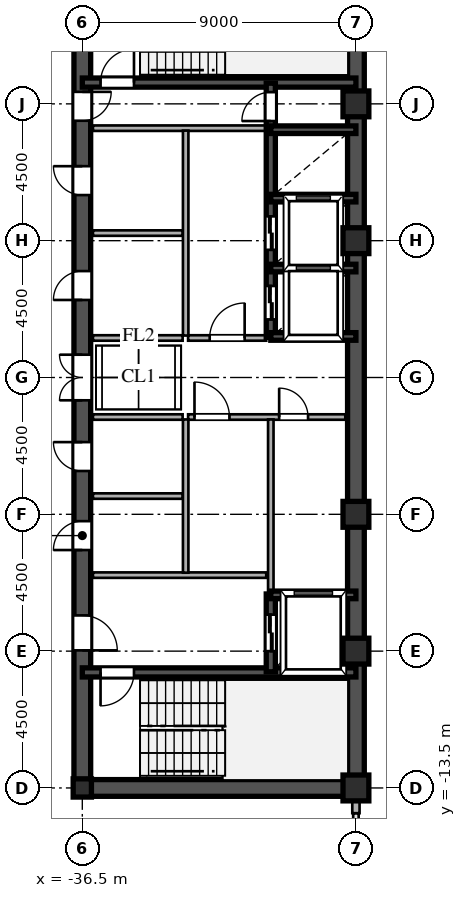
"""IFC4 building model, lengths in metres.
Left out: names, types, materials, properties, quantities, classifications, styles, units other than length and angle.
Written with IfcOpenShell. Run it as: python <this file> out.ifc"""

import sys

from ifc_helpers import new_model, si_unit, direction, frame, frame_2d, origin, origin_2d, place, context, subcontext, project, spatial, rectangle, hollow_rectangle, i_section, extrude, source, transform, mapped, element, fill, save


model = new_model("IFC4")
c1 = context("Model", 3, precision=1e-05, world=origin(), true_north=direction((0.0, 1.0)))
c2 = subcontext(c1, "Body", "Model", "MODEL_VIEW")
j1 = project(units=[si_unit("LENGTHUNIT", "METRE"), si_unit("PLANEANGLEUNIT", "RADIAN")], contexts=[c1])
p1 = place(None, origin())
s1 = spatial("IfcSite", under=j1, at=p1, CompositionType="ELEMENT")
p2 = place(p1, origin())
s2 = spatial("IfcBuilding", under=s1, at=p2, CompositionType="ELEMENT")
p3 = place(p2, frame((0.0, 0.0, 167.1)))
s3 = spatial("IfcBuildingStorey", under=s2, at=p3, CompositionType="ELEMENT", Elevation=167.1)
m1 = source(origin(), c2, "Body", "SweptSolid", [
    extrude(hollow_rectangle(XDim=0.85, YDim=0.85, WallThickness=0.036, at=origin_2d()), origin(), (0.0, 0.0, 1.0), 3.6),
])
for number, where, z_axis, x_axis in (
    (1, (-27.5, -13.5, 0.0), (0.0, 0.0, 1.0), (1.0, 0.0, 0.0)),
    (2, (-27.5, -9.0, 0.0), (0.0, 0.0, 1.0), (1.0, 0.0, 0.0)),
    (3, (-27.5, -4.5, 0.0), (0.0, 0.0, 1.0), (1.0, 0.0, 0.0)),
    (4, (-27.5, 4.5, 0.0), (0.0, 0.0, 1.0), (1.0, 0.0, 0.0)),
    (5, (-27.5, 9.0, 0.0), (0.0, 0.0, 1.0), (1.0, 0.0, 0.0)),
):
    element("IfcColumn", number, at=place(p3, frame(where, z_axis=z_axis, x_axis=x_axis)), inside=s3, PredefinedType="COLUMN", context=c2, shape_type="MappedRepresentation", body=[
        mapped(m1, transform((0.0, 0.0, 0.0), scale=1.0)),
    ])
m2 = source(origin(), c2, "Body", "SweptSolid", [
    extrude(i_section(OverallWidth=0.6, OverallDepth=0.6, WebThickness=0.025, FlangeThickness=0.04, at=origin_2d()), origin(), (0.0, 0.0, 1.0), 3.6),
])
p4 = place(p3, frame((-36.5, -13.5, 0.0), z_axis=(0.0, 0.0, 1.0), x_axis=(1.0, 0.0, 0.0)))
e6 = element("IfcColumn", 6, at=p4, inside=s3, PredefinedType="COLUMN", context=c2, shape_type="MappedRepresentation", body=[
    mapped(m2, transform((0.0, 0.0, 0.0), scale=1.0)),
])
p5 = place(p3, frame((-27.5, -14.33, 0.0), z_axis=(0.0, 0.0, 1.0), x_axis=(0.0, 1.0, 0.0)))
e7 = element("IfcWall", 7, at=p5, inside=s3, PredefinedType="SOLIDWALL", context=c2, shape_type="SweptSolid", body=[
    extrude(rectangle(XDim=0.55, YDim=0.24, at=frame_2d((0.275, 0.0))), origin(), (0.0, 0.0, 1.0), 2.88),
])
for number, where, z_axis, x_axis in (
    (8, (-27.5, -13.5, 0.0), (0.0, 0.0, 1.0), (0.0, 1.0, 0.0)),
    (9, (-27.5, 1.3, 0.0), (0.0, 0.0, 1.0), (0.0, 1.0, 0.0)),
):
    element("IfcWall", number, at=place(p3, frame(where, z_axis=z_axis, x_axis=x_axis)), inside=s3, PredefinedType="SHEAR", context=c2, shape_type="SweptSolid", body=[
        extrude(rectangle(XDim=12.2, YDim=0.55, at=frame_2d((6.1, 0.0))), origin(), (0.0, 0.0, 1.0), 3.38),
    ])
p6 = place(p3, frame((-27.5, -1.3, 0.0), z_axis=(0.0, 0.0, 1.0), x_axis=(0.0, 1.0, 0.0)))
e10 = element("IfcWall", 10, at=p6, inside=s3, PredefinedType="SHEAR", context=c2, shape_type="SweptSolid", body=[
    extrude(rectangle(XDim=2.6, YDim=0.55, at=frame_2d((1.3, 0.0))), origin(), (0.0, 0.0, 1.0), 3.38),
])
p7 = place(p3, frame((-36.5, -13.5, 0.0), z_axis=(0.0, 0.0, 1.0), x_axis=(1.0, 0.0, 0.0)))
e11 = element("IfcWall", 11, at=p7, inside=s3, PredefinedType="SHEAR", context=c2, shape_type="SweptSolid", body=[
    extrude(rectangle(XDim=9.0, YDim=0.55, at=frame_2d((4.5, 0.0))), origin(), (0.0, 0.0, 1.0), 3.38),
])
p8 = place(p3, frame((-36.5, -13.65, 0.0), z_axis=(0.0, 0.0, 1.0), x_axis=(0.0, 1.0, 0.0)))
e12 = element("IfcWall", 12, at=p8, inside=s3, PredefinedType="SHEAR", context=c2, shape_type="SweptSolid", body=[
    extrude(rectangle(XDim=7.15, YDim=0.55, at=frame_2d((3.575, 0.0))), origin(), (0.0, 0.0, 1.0), 3.38),
])
p9 = place(p8, frame((4.675, 0.0, 0.0)))
e13 = element("IfcOpeningElement", 13, at=p9, cuts=e12, PredefinedType="OPENING", context=c2, shape_type="SweptSolid", body=[
    extrude(rectangle(XDim=1.15, YDim=2.2, at=frame_2d((0.575, 1.1))), frame((0.0, 0.285, 0.0), z_axis=(0.0, -1.0, 0.0), x_axis=(1.0, 0.0, 0.0)), (0.0, 0.0, 1.0), 0.57),
])
p10 = place(p3, frame((-36.5, -1.3, 0.0), z_axis=(0.0, 0.0, 1.0), x_axis=(0.0, 1.0, 0.0)))
e14 = element("IfcWall", 14, at=p10, inside=s3, PredefinedType="SHEAR", context=c2, shape_type="SweptSolid", body=[
    extrude(rectangle(XDim=2.6, YDim=0.55, at=frame_2d((1.3, 0.0))), origin(), (0.0, 0.0, 1.0), 3.38),
])
p11 = place(p10, frame((0.55, 0.0, 0.0)))
e15 = element("IfcOpeningElement", 15, at=p11, cuts=e14, PredefinedType="OPENING", context=c2, shape_type="SweptSolid", body=[
    extrude(rectangle(XDim=1.5, YDim=2.3, at=frame_2d((0.75, 1.15))), frame((0.0, 0.285, 0.0), z_axis=(0.0, -1.0, 0.0), x_axis=(1.0, 0.0, 0.0)), (0.0, 0.0, 1.0), 0.57),
])
p12 = place(p3, frame((-36.5, 8.2, 0.0), z_axis=(0.0, 0.0, 1.0), x_axis=(0.0, 1.0, 0.0)))
e16 = element("IfcWall", 16, at=p12, inside=s3, PredefinedType="SHEAR", context=c2, shape_type="SweptSolid", body=[
    extrude(rectangle(XDim=5.45, YDim=0.55, at=frame_2d((2.725, 0.0))), origin(), (0.0, 0.0, 1.0), 3.38),
])
p13 = place(p12, frame((0.245, 0.0, 0.0)))
e17 = element("IfcOpeningElement", 17, at=p13, cuts=e16, PredefinedType="OPENING", context=c2, shape_type="SweptSolid", body=[
    extrude(rectangle(XDim=0.95, YDim=2.15, at=frame_2d((0.475, 1.075))), frame((0.0, 0.285, 0.0), z_axis=(0.0, -1.0, 0.0), x_axis=(1.0, 0.0, 0.0)), (0.0, 0.0, 1.0), 0.57),
])
p14 = place(p3, frame((-36.5, -6.5, 0.0), z_axis=(0.0, 0.0, 1.0), x_axis=(0.0, 1.0, 0.0)))
e18 = element("IfcWall", 18, at=p14, inside=s3, PredefinedType="SHEAR", context=c2, shape_type="SweptSolid", body=[
    extrude(rectangle(XDim=2.6, YDim=0.55, at=frame_2d((1.3, 0.0))), origin(), (0.0, 0.0, 1.0), 3.38),
])
p15 = place(p14, frame((0.825, 0.0, 0.0)))
e19 = element("IfcOpeningElement", 19, at=p15, cuts=e18, PredefinedType="OPENING", context=c2, shape_type="SweptSolid", body=[
    extrude(rectangle(XDim=0.95, YDim=2.15, at=frame_2d((0.475, 1.075))), frame((0.0, 0.285, 0.0), z_axis=(0.0, -1.0, 0.0), x_axis=(1.0, 0.0, 0.0)), (0.0, 0.0, 1.0), 0.57),
])
p16 = place(p3, frame((-36.5, -3.9, 0.0), z_axis=(0.0, 0.0, 1.0), x_axis=(0.0, 1.0, 0.0)))
e20 = element("IfcWall", 20, at=p16, inside=s3, PredefinedType="SHEAR", context=c2, shape_type="SweptSolid", body=[
    extrude(rectangle(XDim=2.6, YDim=0.55, at=frame_2d((1.3, 0.0))), origin(), (0.0, 0.0, 1.0), 3.38),
])
p17 = place(p16, frame((0.825, 0.0, 0.0)))
e21 = element("IfcOpeningElement", 21, at=p17, cuts=e20, PredefinedType="OPENING", context=c2, shape_type="SweptSolid", body=[
    extrude(rectangle(XDim=0.95, YDim=2.15, at=frame_2d((0.475, 1.075))), frame((0.0, 0.285, 0.0), z_axis=(0.0, -1.0, 0.0), x_axis=(1.0, 0.0, 0.0)), (0.0, 0.0, 1.0), 0.57),
])
p18 = place(p3, frame((-36.5, 1.3, 0.0), z_axis=(0.0, 0.0, 1.0), x_axis=(0.0, 1.0, 0.0)))
e22 = element("IfcWall", 22, at=p18, inside=s3, PredefinedType="SHEAR", context=c2, shape_type="SweptSolid", body=[
    extrude(rectangle(XDim=3.45, YDim=0.55, at=frame_2d((1.725, 0.0))), origin(), (0.0, 0.0, 1.0), 3.38),
])
p19 = place(p18, frame((1.25, 0.0, 0.0)))
e23 = element("IfcOpeningElement", 23, at=p19, cuts=e22, PredefinedType="OPENING", context=c2, shape_type="SweptSolid", body=[
    extrude(rectangle(XDim=0.95, YDim=2.15, at=frame_2d((0.475, 1.075))), frame((0.0, 0.285, 0.0), z_axis=(0.0, -1.0, 0.0), x_axis=(1.0, 0.0, 0.0)), (0.0, 0.0, 1.0), 0.57),
])
p20 = place(p3, frame((-36.5, 4.75, 0.0), z_axis=(0.0, 0.0, 1.0), x_axis=(0.0, 1.0, 0.0)))
e24 = element("IfcWall", 24, at=p20, inside=s3, PredefinedType="SHEAR", context=c2, shape_type="SweptSolid", body=[
    extrude(rectangle(XDim=3.45, YDim=0.55, at=frame_2d((1.725, 0.0))), origin(), (0.0, 0.0, 1.0), 3.38),
])
p21 = place(p20, frame((1.25, 0.0, 0.0)))
e25 = element("IfcOpeningElement", 25, at=p21, cuts=e24, PredefinedType="OPENING", context=c2, shape_type="SweptSolid", body=[
    extrude(rectangle(XDim=0.95, YDim=2.15, at=frame_2d((0.475, 1.075))), frame((0.0, 0.285, 0.0), z_axis=(0.0, -1.0, 0.0), x_axis=(1.0, 0.0, 0.0)), (0.0, 0.0, 1.0), 0.57),
])
p22 = place(p3, frame((-36.5, -9.7, 0.0), z_axis=(0.0, 0.0, 1.0), x_axis=(1.0, 0.0, 0.0)))
e26 = element("IfcWall", 26, at=p22, inside=s3, PredefinedType="SHEAR", context=c2, shape_type="SweptSolid", body=[
    extrude(rectangle(XDim=9.0, YDim=0.3, at=frame_2d((4.5, 0.0))), origin(), (0.0, 0.0, 1.0), 3.38),
])
p23 = place(p22, frame((0.6, 0.0, 0.0)))
e27 = element("IfcOpeningElement", 27, at=p23, cuts=e26, PredefinedType="OPENING", context=c2, shape_type="SweptSolid", body=[
    extrude(rectangle(XDim=1.1, YDim=2.2, at=frame_2d((0.55, 1.1))), frame((0.0, 0.16, 0.0), z_axis=(0.0, -1.0, 0.0), x_axis=(1.0, 0.0, 0.0)), (0.0, 0.0, 1.0), 0.32),
])
p24 = place(p3, frame((-36.5, 9.7, 0.0), z_axis=(0.0, 0.0, 1.0), x_axis=(1.0, 0.0, 0.0)))
e28 = element("IfcWall", 28, at=p24, inside=s3, PredefinedType="SHEAR", context=c2, shape_type="SweptSolid", body=[
    extrude(rectangle(XDim=9.0, YDim=0.3, at=frame_2d((4.5, 0.0))), origin(), (0.0, 0.0, 1.0), 3.38),
])
p25 = place(p24, frame((0.6, 0.0, 0.0)))
e29 = element("IfcOpeningElement", 29, at=p25, cuts=e28, PredefinedType="OPENING", context=c2, shape_type="SweptSolid", body=[
    extrude(rectangle(XDim=1.1, YDim=2.2, at=frame_2d((0.55, 1.1))), frame((0.0, 0.16, 0.0), z_axis=(0.0, -1.0, 0.0), x_axis=(1.0, 0.0, 0.0)), (0.0, 0.0, 1.0), 0.32),
])
for number, where, z_axis, x_axis in (
    (30, (-30.3, -7.15, 0.0), (0.0, 0.0, 1.0), (1.0, 0.0, 0.0)),
    (31, (-30.3, 1.35, 0.0), (0.0, 0.0, 1.0), (1.0, 0.0, 0.0)),
    (32, (-30.3, 3.6, 0.0), (0.0, 0.0, 1.0), (1.0, 0.0, 0.0)),
    (33, (-30.3, 5.9, 0.0), (0.0, 0.0, 1.0), (1.0, 0.0, 0.0)),
    (34, (-30.3, 8.15, 0.0), (0.0, 0.0, 1.0), (1.0, 0.0, 0.0)),
):
    element("IfcWall", number, at=place(p3, frame(where, z_axis=z_axis, x_axis=x_axis)), inside=s3, PredefinedType="SHEAR", context=c2, shape_type="SweptSolid", body=[
        extrude(rectangle(XDim=2.8, YDim=0.25, at=frame_2d((1.4, 0.0))), origin(), (0.0, 0.0, 1.0), 3.38),
    ])
p26 = place(p3, frame((-30.3, -9.68, 0.0), z_axis=(0.0, 0.0, 1.0), x_axis=(0.0, 1.0, 0.0)))
e35 = element("IfcWall", 35, at=p26, inside=s3, PredefinedType="SHEAR", context=c2, shape_type="SweptSolid", body=[
    extrude(rectangle(XDim=2.56, YDim=0.3, at=frame_2d((1.28, 0.0))), origin(), (0.0, 0.0, 1.0), 3.38),
])
p27 = place(p26, frame((0.68, 0.0, 0.0)))
e36 = element("IfcOpeningElement", 36, at=p27, cuts=e35, PredefinedType="OPENING", context=c2, shape_type="SweptSolid", body=[
    extrude(rectangle(XDim=1.2, YDim=2.25, at=frame_2d((0.6, 1.125))), frame((0.0, 0.16, 0.0), z_axis=(0.0, -1.0, 0.0), x_axis=(1.0, 0.0, 0.0)), (0.0, 0.0, 1.0), 0.32),
])
p28 = place(p3, frame((-30.3, 1.32, 0.0), z_axis=(0.0, 0.0, 1.0), x_axis=(0.0, 1.0, 0.0)))
e37 = element("IfcWall", 37, at=p28, inside=s3, PredefinedType="SHEAR", context=c2, shape_type="SweptSolid", body=[
    extrude(rectangle(XDim=2.28, YDim=0.3, at=frame_2d((1.14, 0.0))), origin(), (0.0, 0.0, 1.0), 3.38),
])
p29 = place(p28, frame((0.59, 0.0, 0.0)))
e38 = element("IfcOpeningElement", 38, at=p29, cuts=e37, PredefinedType="OPENING", context=c2, shape_type="SweptSolid", body=[
    extrude(rectangle(XDim=1.1, YDim=2.2, at=frame_2d((0.55, 1.1))), frame((0.0, 0.16, 0.0), z_axis=(0.0, -1.0, 0.0), x_axis=(1.0, 0.0, 0.0)), (0.0, 0.0, 1.0), 0.32),
])
p30 = place(p3, frame((-30.3, 3.6, 0.0), z_axis=(0.0, 0.0, 1.0), x_axis=(0.0, 1.0, 0.0)))
e39 = element("IfcWall", 39, at=p30, inside=s3, PredefinedType="SHEAR", context=c2, shape_type="SweptSolid", body=[
    extrude(rectangle(XDim=2.3, YDim=0.3, at=frame_2d((1.15, 0.0))), origin(), (0.0, 0.0, 1.0), 3.38),
])
p31 = place(p30, frame((0.6, 0.0, 0.0)))
e40 = element("IfcOpeningElement", 40, at=p31, cuts=e39, PredefinedType="OPENING", context=c2, shape_type="SweptSolid", body=[
    extrude(rectangle(XDim=1.1, YDim=2.2, at=frame_2d((0.55, 1.1))), frame((0.0, 0.16, 0.0), z_axis=(0.0, -1.0, 0.0), x_axis=(1.0, 0.0, 0.0)), (0.0, 0.0, 1.0), 0.32),
])
p32 = place(p3, frame((-30.3, 5.9, 0.0), z_axis=(0.0, 0.0, 1.0), x_axis=(0.0, 1.0, 0.0)))
e41 = element("IfcWall", 41, at=p32, inside=s3, PredefinedType="SHEAR", context=c2, shape_type="SweptSolid", body=[
    extrude(rectangle(XDim=2.25, YDim=0.3, at=frame_2d((1.125, 0.0))), origin(), (0.0, 0.0, 1.0), 3.38),
])
p33 = place(p3, frame((-30.3, 8.15, 0.0), z_axis=(0.0, 0.0, 1.0), x_axis=(0.0, 1.0, 0.0)))
e42 = element("IfcWall", 42, at=p33, inside=s3, PredefinedType="SHEAR", context=c2, shape_type="SweptSolid", body=[
    extrude(rectangle(XDim=1.53, YDim=0.3, at=frame_2d((0.765, 0.0))), origin(), (0.0, 0.0, 1.0), 3.38),
])
p34 = place(p33, frame((0.285, 0.0, 0.0)))
e43 = element("IfcOpeningElement", 43, at=p34, cuts=e42, PredefinedType="OPENING", context=c2, shape_type="SweptSolid", body=[
    extrude(rectangle(XDim=0.95, YDim=2.15, at=frame_2d((0.475, 1.075))), frame((0.0, 0.16, 0.0), z_axis=(0.0, -1.0, 0.0), x_axis=(1.0, 0.0, 0.0)), (0.0, 0.0, 1.0), 0.32),
])
for number, where, z_axis, x_axis in (
    (44, (-36.15, -6.5, 0.0), (0.0, 0.0, 1.0), (1.0, 0.0, 0.0)),
    (45, (-36.15, 8.2, 0.0), (0.0, 0.0, 1.0), (1.0, 0.0, 0.0)),
):
    element("IfcWall", number, at=place(p3, frame(where, z_axis=z_axis, x_axis=x_axis)), inside=s3, PredefinedType="PARTITIONING", context=c2, shape_type="SweptSolid", body=[
        extrude(rectangle(XDim=5.7, YDim=0.18, at=frame_2d((2.85, 0.0))), origin(), (0.0, 0.0, 1.0), 3.38),
    ])
p35 = place(p3, frame((-33.1, -6.42, 0.0), z_axis=(0.0, 0.0, 1.0), x_axis=(0.0, 1.0, 0.0)))
e46 = element("IfcWall", 46, at=p35, inside=s3, PredefinedType="PARTITIONING", context=c2, shape_type="SweptSolid", body=[
    extrude(rectangle(XDim=5.04, YDim=0.18, at=frame_2d((2.52, 0.0))), origin(), (0.0, 0.0, 1.0), 3.38),
])
p36 = place(p3, frame((-33.1, 1.38, 0.0), z_axis=(0.0, 0.0, 1.0), x_axis=(0.0, 1.0, 0.0)))
e47 = element("IfcWall", 47, at=p36, inside=s3, PredefinedType="PARTITIONING", context=c2, shape_type="SweptSolid", body=[
    extrude(rectangle(XDim=6.74, YDim=0.18, at=frame_2d((3.37, 0.0))), origin(), (0.0, 0.0, 1.0), 3.38),
])
p37 = place(p3, frame((-30.3, -1.3, 0.0), z_axis=(0.0, 0.0, 1.0), x_axis=(1.0, 0.0, 0.0)))
e48 = element("IfcWall", 48, at=p37, inside=s3, PredefinedType="PARTITIONING", context=c2, shape_type="SweptSolid", body=[
    extrude(rectangle(XDim=2.45, YDim=0.18, at=frame_2d((1.225, 0.0))), origin(), (0.0, 0.0, 1.0), 3.38),
])
p38 = place(p37, frame((0.275, 0.0, 0.0)))
e49 = element("IfcOpeningElement", 49, at=p38, cuts=e48, PredefinedType="OPENING", context=c2, shape_type="SweptSolid", body=[
    extrude(rectangle(XDim=0.95, YDim=2.15, at=frame_2d((0.475, 1.075))), frame((0.0, 0.1, 0.0), z_axis=(0.0, -1.0, 0.0), x_axis=(1.0, 0.0, 0.0)), (0.0, 0.0, 1.0), 0.2),
])
p39 = place(p3, frame((-33.02, -1.3, 0.0), z_axis=(0.0, 0.0, 1.0), x_axis=(1.0, 0.0, 0.0)))
e50 = element("IfcWall", 50, at=p39, inside=s3, PredefinedType="PARTITIONING", context=c2, shape_type="SweptSolid", body=[
    extrude(rectangle(XDim=2.72, YDim=0.18, at=frame_2d((1.36, 0.0))), origin(), (0.0, 0.0, 1.0), 3.38),
])
p40 = place(p39, frame((0.21, 0.0, 0.0)))
e51 = element("IfcOpeningElement", 51, at=p40, cuts=e50, PredefinedType="OPENING", context=c2, shape_type="SweptSolid", body=[
    extrude(rectangle(XDim=1.15, YDim=2.2, at=frame_2d((0.575, 1.1))), frame((0.0, 0.1, 0.0), z_axis=(0.0, -1.0, 0.0), x_axis=(1.0, 0.0, 0.0)), (0.0, 0.0, 1.0), 0.2),
])
p41 = place(p3, frame((-30.3, -7.12, 0.0), z_axis=(0.0, 0.0, 1.0), x_axis=(0.0, 1.0, 0.0)))
e52 = element("IfcWall", 52, at=p41, inside=s3, PredefinedType="PARTITIONING", context=c2, shape_type="SweptSolid", body=[
    extrude(rectangle(XDim=5.74, YDim=0.18, at=frame_2d((2.87, 0.0))), origin(), (0.0, 0.0, 1.0), 3.38),
])
p42 = place(p3, frame((-33.02, 1.3, 0.0), z_axis=(0.0, 0.0, 1.0), x_axis=(1.0, 0.0, 0.0)))
e53 = element("IfcWall", 53, at=p42, inside=s3, PredefinedType="PARTITIONING", context=c2, shape_type="SweptSolid", body=[
    extrude(rectangle(XDim=2.57, YDim=0.18, at=frame_2d((1.285, 0.0))), origin(), (0.0, 0.0, 1.0), 3.38),
])
p43 = place(p42, frame((0.71, 0.0, 0.0)))
e54 = element("IfcOpeningElement", 54, at=p43, cuts=e53, PredefinedType="OPENING", context=c2, shape_type="SweptSolid", body=[
    extrude(rectangle(XDim=1.15, YDim=2.2, at=frame_2d((0.575, 1.1))), frame((0.0, 0.1, 0.0), z_axis=(0.0, -1.0, 0.0), x_axis=(1.0, 0.0, 0.0)), (0.0, 0.0, 1.0), 0.2),
])
for number, where, z_axis, x_axis in (
    (55, (-36.15, -1.3, 0.0), (0.0, 0.0, 1.0), (1.0, 0.0, 0.0)),
    (56, (-36.15, 1.3, 0.0), (0.0, 0.0, 1.0), (1.0, 0.0, 0.0)),
    (57, (-36.15, -3.9, 0.0), (0.0, 0.0, 1.0), (1.0, 0.0, 0.0)),
    (58, (-36.15, 4.75, 0.0), (0.0, 0.0, 1.0), (1.0, 0.0, 0.0)),
):
    element("IfcWall", number, at=place(p3, frame(where, z_axis=z_axis, x_axis=x_axis)), inside=s3, PredefinedType="PARTITIONING", context=c2, shape_type="SweptSolid", body=[
        extrude(rectangle(XDim=2.95, YDim=0.18, at=frame_2d((1.475, 0.0))), origin(), (0.0, 0.0, 1.0), 3.38),
    ])
m3 = source(origin(), c2, "Body", "SweptSolid", [
    extrude(rectangle(XDim=1.15, YDim=2.2, at=frame_2d((0.575, 1.1))), frame((0.0, 0.025, 0.0), z_axis=(0.0, -1.0, 0.0), x_axis=(1.0, 0.0, 0.0)), (0.0, 0.0, 1.0), 0.05),
])
p44 = place(p9, frame((1.15, 0.0, 0.0), z_axis=(0.0, 0.0, 1.0), x_axis=(-1.0, 0.0, 0.0)))
e59 = element("IfcDoor", 59, at=p44, inside=s3, OperationType="SINGLE_SWING_LEFT", PredefinedType="DOOR", context=c2, shape_type="MappedRepresentation", body=[
    mapped(m3, transform((0.0, 0.0, 0.0), scale=1.0)),
])
fill(e13, e59)
m4 = source(origin(), c2, "Body", "SweptSolid", [
    extrude(rectangle(XDim=1.5, YDim=2.3, at=frame_2d((0.75, 1.15))), frame((0.0, 0.025, 0.0), z_axis=(0.0, -1.0, 0.0), x_axis=(1.0, 0.0, 0.0)), (0.0, 0.0, 1.0), 0.05),
])
p45 = place(p11, origin())
e60 = element("IfcDoor", 60, at=p45, inside=s3, OperationType="DOUBLE_SWING_LEFT", PredefinedType="DOOR", context=c2, shape_type="MappedRepresentation", body=[
    mapped(m4, transform((0.0, 0.0, 0.0), scale=1.0)),
])
fill(e15, e60)
m5 = source(origin(), c2, "Body", "SweptSolid", [
    extrude(rectangle(XDim=0.95, YDim=2.15, at=frame_2d((0.475, 1.075))), frame((0.0, 0.025, 0.0), z_axis=(0.0, -1.0, 0.0), x_axis=(1.0, 0.0, 0.0)), (0.0, 0.0, 1.0), 0.05),
])
p46 = place(p13, frame((0.95, 0.0, 0.0), z_axis=(0.0, 0.0, 1.0), x_axis=(-1.0, 0.0, 0.0)))
e61 = element("IfcDoor", 61, at=p46, inside=s3, OperationType="SINGLE_SWING_RIGHT", PredefinedType="DOOR", context=c2, shape_type="MappedRepresentation", body=[
    mapped(m5, transform((0.0, 0.0, 0.0), scale=1.0)),
])
fill(e17, e61)
p47 = place(p15, origin())
e62 = element("IfcDoor", 62, at=p47, inside=s3, OperationType="SINGLE_SWING_LEFT", PredefinedType="DOOR", context=c2, shape_type="MappedRepresentation", body=[
    mapped(m5, transform((0.0, 0.0, 0.0), scale=1.0)),
])
fill(e19, e62)
p48 = place(p17, origin())
e63 = element("IfcDoor", 63, at=p48, inside=s3, OperationType="SINGLE_SWING_RIGHT", PredefinedType="DOOR", context=c2, shape_type="MappedRepresentation", body=[
    mapped(m5, transform((0.0, 0.0, 0.0), scale=1.0)),
])
fill(e21, e63)
p49 = place(p19, origin())
e64 = element("IfcDoor", 64, at=p49, inside=s3, OperationType="SINGLE_SWING_LEFT", PredefinedType="DOOR", context=c2, shape_type="MappedRepresentation", body=[
    mapped(m5, transform((0.0, 0.0, 0.0), scale=1.0)),
])
fill(e23, e64)
p50 = place(p21, origin())
e65 = element("IfcDoor", 65, at=p50, inside=s3, OperationType="SINGLE_SWING_RIGHT", PredefinedType="DOOR", context=c2, shape_type="MappedRepresentation", body=[
    mapped(m5, transform((0.0, 0.0, 0.0), scale=1.0)),
])
fill(e25, e65)
m6 = source(origin(), c2, "Body", "SweptSolid", [
    extrude(rectangle(XDim=1.1, YDim=2.2, at=frame_2d((0.55, 1.1))), frame((0.0, 0.025, 0.0), z_axis=(0.0, -1.0, 0.0), x_axis=(1.0, 0.0, 0.0)), (0.0, 0.0, 1.0), 0.05),
])
p51 = place(p23, frame((1.1, 0.0, 0.0), z_axis=(0.0, 0.0, 1.0), x_axis=(-1.0, 0.0, 0.0)))
e66 = element("IfcDoor", 66, at=p51, inside=s3, OperationType="SINGLE_SWING_LEFT", PredefinedType="DOOR", context=c2, shape_type="MappedRepresentation", body=[
    mapped(m6, transform((0.0, 0.0, 0.0), scale=1.0)),
])
fill(e27, e66)
p52 = place(p25, origin())
e67 = element("IfcDoor", 67, at=p52, inside=s3, OperationType="SINGLE_SWING_RIGHT", PredefinedType="DOOR", context=c2, shape_type="MappedRepresentation", body=[
    mapped(m6, transform((0.0, 0.0, 0.0), scale=1.0)),
])
fill(e29, e67)
m7 = source(origin(), c2, "Body", "SweptSolid", [
    extrude(rectangle(XDim=1.2, YDim=2.25, at=frame_2d((0.6, 1.125))), frame((0.0, 0.025, 0.0), z_axis=(0.0, -1.0, 0.0), x_axis=(1.0, 0.0, 0.0)), (0.0, 0.0, 1.0), 0.05),
])
p53 = place(p27, origin())
e68 = element("IfcDoor", 68, at=p53, inside=s3, OperationType="DOUBLE_DOOR_SLIDING", PredefinedType="DOOR", context=c2, shape_type="MappedRepresentation", body=[
    mapped(m7, transform((0.0, 0.0, 0.0), scale=1.0)),
])
fill(e36, e68)
m8 = source(origin(), c2, "Body", "SweptSolid", [
    extrude(rectangle(XDim=1.1, YDim=2.2, at=frame_2d((0.55, 1.1))), frame((0.0, 0.025, 0.0), z_axis=(0.0, -1.0, 0.0), x_axis=(1.0, 0.0, 0.0)), (0.0, 0.0, 1.0), 0.05),
])
p54 = place(p29, origin())
e69 = element("IfcDoor", 69, at=p54, inside=s3, OperationType="DOUBLE_DOOR_SLIDING", PredefinedType="DOOR", context=c2, shape_type="MappedRepresentation", body=[
    mapped(m8, transform((0.0, 0.0, 0.0), scale=1.0)),
])
fill(e38, e69)
p55 = place(p31, origin())
e70 = element("IfcDoor", 70, at=p55, inside=s3, OperationType="DOUBLE_DOOR_SLIDING", PredefinedType="DOOR", context=c2, shape_type="MappedRepresentation", body=[
    mapped(m8, transform((0.0, 0.0, 0.0), scale=1.0)),
])
fill(e40, e70)
p56 = place(p34, origin())
e71 = element("IfcDoor", 71, at=p56, inside=s3, OperationType="SINGLE_SWING_LEFT", PredefinedType="DOOR", context=c2, shape_type="MappedRepresentation", body=[
    mapped(m5, transform((0.0, 0.0, 0.0), scale=1.0)),
])
fill(e43, e71)
p57 = place(p38, origin())
e72 = element("IfcDoor", 72, at=p57, inside=s3, OperationType="SINGLE_SWING_LEFT", PredefinedType="DOOR", context=c2, shape_type="MappedRepresentation", body=[
    mapped(m5, transform((0.0, 0.0, 0.0), scale=1.0)),
])
fill(e49, e72)
p58 = place(p40, origin())
e73 = element("IfcDoor", 73, at=p58, inside=s3, OperationType="SINGLE_SWING_LEFT", PredefinedType="DOOR", context=c2, shape_type="MappedRepresentation", body=[
    mapped(m3, transform((0.0, 0.0, 0.0), scale=1.0)),
])
fill(e51, e73)
p59 = place(p43, origin())
e74 = element("IfcDoor", 74, at=p59, inside=s3, OperationType="SINGLE_SWING_RIGHT", PredefinedType="DOOR", context=c2, shape_type="MappedRepresentation", body=[
    mapped(m3, transform((0.0, 0.0, 0.0), scale=1.0)),
])
fill(e54, e74)
save(model, sys.argv[1])
